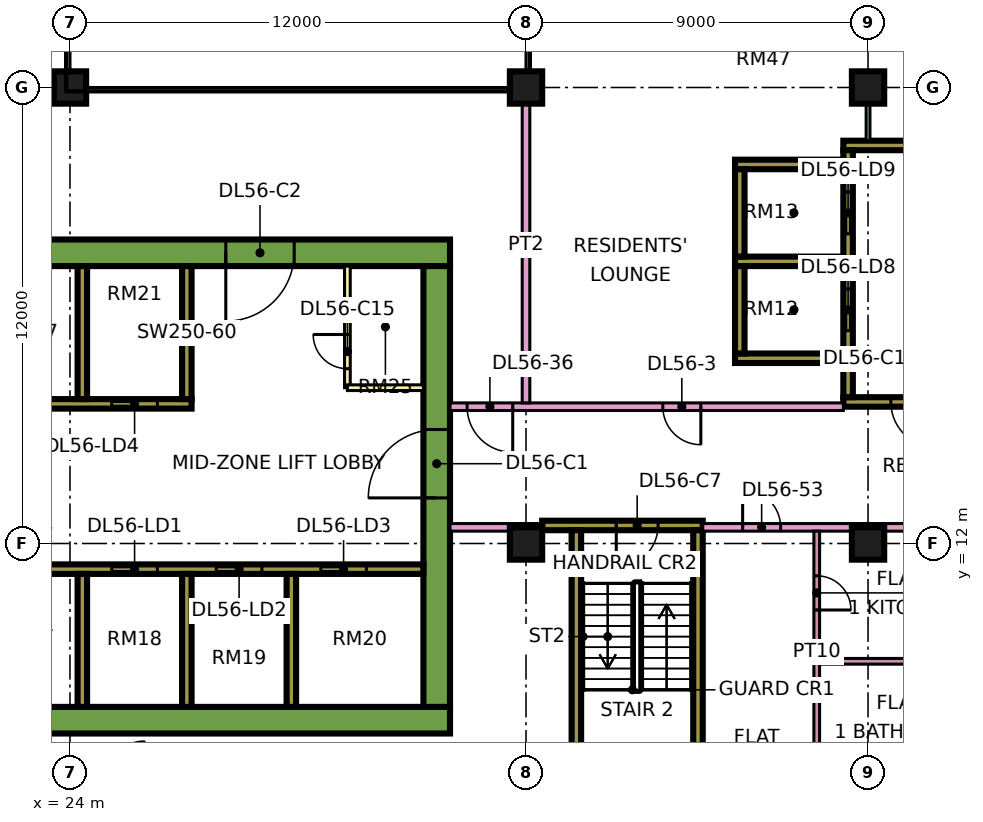
"""IFC4 building model, lengths in metres.
Left out: names, types, materials, properties, quantities, classifications, styles, units other than length and angle.
Written with IfcOpenShell. Run it as: python <this file> out.ifc"""

import sys

from ifc_helpers import new_model, si_unit, direction, frame, frame_2d, origin, origin_2d, place, context, subcontext, project, spatial, rectangle, extrude, element, fill, save


model = new_model("IFC4")
c1 = context("Model", 3, precision=1e-05, world=origin(), true_north=direction((0.0, 1.0)))
c2 = subcontext(c1, "Body", "Model", "MODEL_VIEW")
j1 = project(units=[si_unit("LENGTHUNIT", "METRE"), si_unit("PLANEANGLEUNIT", "RADIAN")], contexts=[c1])
p1 = place(None, origin())
s1 = spatial("IfcSite", under=j1, at=p1, CompositionType="ELEMENT")
p2 = place(p1, origin())
s2 = spatial("IfcBuilding", under=s1, at=p2, CompositionType="ELEMENT")
p3 = place(p2, frame((0.0, 0.0, 237.9)))
s3 = spatial("IfcBuildingStorey", under=s2, at=p3, CompositionType="ELEMENT", Elevation=237.9)
for number, where, z_axis, x_axis in (
    (1, (24.0, 24.0, 0.0), (0.0, 0.0, 1.0), (1.0, 0.0, 0.0)),
    (2, (36.0, 12.0, 0.0), (0.0, 0.0, 1.0), (1.0, 0.0, 0.0)),
    (3, (36.0, 24.0, 0.0), (0.0, 0.0, 1.0), (1.0, 0.0, 0.0)),
    (4, (45.0, 12.0, 0.0), (0.0, 0.0, 1.0), (1.0, 0.0, 0.0)),
    (5, (45.0, 24.0, 0.0), (0.0, 0.0, 1.0), (1.0, 0.0, 0.0)),
):
    element("IfcColumn", number, at=place(p3, frame(where, z_axis=z_axis, x_axis=x_axis)), inside=s3, PredefinedType="COLUMN", context=c2, shape_type="SweptSolid", body=[
        extrude(rectangle(XDim=0.85, YDim=0.85, at=origin_2d()), origin(), (0.0, 0.0, 1.0), 3.75),
    ])
p4 = place(p3, frame((9.0, 7.35, 0.0), z_axis=(0.0, 0.0, 1.0), x_axis=(1.0, 0.0, 0.0)))
e6 = element("IfcWall", 6, at=p4, inside=s3, PredefinedType="SHEAR", context=c2, shape_type="SweptSolid", body=[
    extrude(rectangle(XDim=25.0, YDim=0.7, at=frame_2d((12.5, 0.0))), origin(), (0.0, 0.0, 1.0), 3.75),
])
p5 = place(p3, frame((9.0, 19.65, 0.0), z_axis=(0.0, 0.0, 1.0), x_axis=(1.0, 0.0, 0.0)))
e7 = element("IfcWall", 7, at=p5, inside=s3, PredefinedType="SHEAR", context=c2, shape_type="SweptSolid", body=[
    extrude(rectangle(XDim=25.0, YDim=0.7, at=frame_2d((12.5, 0.0))), origin(), (0.0, 0.0, 1.0), 3.75),
])
p6 = place(p5, frame((19.1, 0.0, 0.0)))
e8 = element("IfcOpeningElement", 8, at=p6, cuts=e7, PredefinedType="OPENING", context=c2, shape_type="SweptSolid", body=[
    extrude(rectangle(XDim=1.8, YDim=2.4, at=frame_2d((0.9, 1.2))), frame((0.0, 0.36, 0.0), z_axis=(0.0, -1.0, 0.0), x_axis=(1.0, 0.0, 0.0)), (0.0, 0.0, 1.0), 0.72),
])
p7 = place(p3, frame((33.65, 7.7, 0.0), z_axis=(0.0, 0.0, 1.0), x_axis=(0.0, 1.0, 0.0)))
e9 = element("IfcWall", 9, at=p7, inside=s3, PredefinedType="SHEAR", context=c2, shape_type="SweptSolid", body=[
    extrude(rectangle(XDim=11.6, YDim=0.7, at=frame_2d((5.8, 0.0))), origin(), (0.0, 0.0, 1.0), 3.75),
])
p8 = place(p7, frame((5.5, 0.0, 0.0)))
e10 = element("IfcOpeningElement", 10, at=p8, cuts=e9, PredefinedType="OPENING", context=c2, shape_type="SweptSolid", body=[
    extrude(rectangle(XDim=1.8, YDim=2.4, at=frame_2d((0.9, 1.2))), frame((0.0, 0.36, 0.0), z_axis=(0.0, -1.0, 0.0), x_axis=(1.0, 0.0, 0.0)), (0.0, 0.0, 1.0), 0.72),
])
p9 = place(p3, frame((13.45, 11.325, 0.0), z_axis=(0.0, 0.0, 1.0), x_axis=(1.0, 0.0, 0.0)))
e11 = element("IfcWall", 11, at=p9, inside=s3, PredefinedType="SHEAR", context=c2, shape_type="SweptSolid", body=[
    extrude(rectangle(XDim=19.85, YDim=0.25, at=frame_2d((9.925, 0.0))), origin(), (0.0, 0.0, 1.0), 3.75),
])
p10 = place(p9, frame((11.65, 0.0, 0.0)))
e12 = element("IfcOpeningElement", 12, at=p10, cuts=e11, PredefinedType="OPENING", context=c2, shape_type="SweptSolid", body=[
    extrude(rectangle(XDim=1.2, YDim=2.2, at=frame_2d((0.6, 1.1))), frame((0.0, 0.135, 0.0), z_axis=(0.0, -1.0, 0.0), x_axis=(1.0, 0.0, 0.0)), (0.0, 0.0, 1.0), 0.27),
])
p11 = place(p9, frame((14.4, 0.0, 0.0)))
e13 = element("IfcOpeningElement", 13, at=p11, cuts=e11, PredefinedType="OPENING", context=c2, shape_type="SweptSolid", body=[
    extrude(rectangle(XDim=1.2, YDim=2.2, at=frame_2d((0.6, 1.1))), frame((0.0, 0.135, 0.0), z_axis=(0.0, -1.0, 0.0), x_axis=(1.0, 0.0, 0.0)), (0.0, 0.0, 1.0), 0.27),
])
p12 = place(p9, frame((17.15, 0.0, 0.0)))
e14 = element("IfcOpeningElement", 14, at=p12, cuts=e11, PredefinedType="OPENING", context=c2, shape_type="SweptSolid", body=[
    extrude(rectangle(XDim=1.2, YDim=2.2, at=frame_2d((0.6, 1.1))), frame((0.0, 0.135, 0.0), z_axis=(0.0, -1.0, 0.0), x_axis=(1.0, 0.0, 0.0)), (0.0, 0.0, 1.0), 0.27),
])
p13 = place(p9, frame((1.55, 0.0, 0.0)))
e15 = element("IfcOpeningElement", 15, at=p13, cuts=e11, PredefinedType="OPENING", context=c2, shape_type="SweptSolid", body=[
    extrude(rectangle(XDim=0.9, YDim=2.1, at=frame_2d((0.45, 1.05))), frame((0.0, 0.135, 0.0), z_axis=(0.0, -1.0, 0.0), x_axis=(1.0, 0.0, 0.0)), (0.0, 0.0, 1.0), 0.27),
])
p14 = place(p9, frame((5.05, 0.0, 0.0)))
e16 = element("IfcOpeningElement", 16, at=p14, cuts=e11, PredefinedType="OPENING", context=c2, shape_type="SweptSolid", body=[
    extrude(rectangle(XDim=0.9, YDim=2.1, at=frame_2d((0.45, 1.05))), frame((0.0, 0.135, 0.0), z_axis=(0.0, -1.0, 0.0), x_axis=(1.0, 0.0, 0.0)), (0.0, 0.0, 1.0), 0.27),
])
p15 = place(p9, frame((8.425, 0.0, 0.0)))
e17 = element("IfcOpeningElement", 17, at=p15, cuts=e11, PredefinedType="OPENING", context=c2, shape_type="SweptSolid", body=[
    extrude(rectangle(XDim=0.9, YDim=2.1, at=frame_2d((0.45, 1.05))), frame((0.0, 0.135, 0.0), z_axis=(0.0, -1.0, 0.0), x_axis=(1.0, 0.0, 0.0)), (0.0, 0.0, 1.0), 0.27),
])
p16 = place(p3, frame((13.45, 15.675, 0.0), z_axis=(0.0, 0.0, 1.0), x_axis=(1.0, 0.0, 0.0)))
e18 = element("IfcWall", 18, at=p16, inside=s3, PredefinedType="SHEAR", context=c2, shape_type="SweptSolid", body=[
    extrude(rectangle(XDim=13.75, YDim=0.25, at=frame_2d((6.875, 0.0))), origin(), (0.0, 0.0, 1.0), 3.75),
])
p17 = place(p16, frame((11.65, 0.0, 0.0)))
e19 = element("IfcOpeningElement", 19, at=p17, cuts=e18, PredefinedType="OPENING", context=c2, shape_type="SweptSolid", body=[
    extrude(rectangle(XDim=1.2, YDim=2.2, at=frame_2d((0.6, 1.1))), frame((0.0, 0.135, 0.0), z_axis=(0.0, -1.0, 0.0), x_axis=(1.0, 0.0, 0.0)), (0.0, 0.0, 1.0), 0.27),
])
for number, where, z_axis, x_axis in (
    (20, (24.325, 7.7, 0.0), (0.0, 0.0, 1.0), (0.0, 1.0, 0.0)),
    (21, (27.075, 7.7, 0.0), (0.0, 0.0, 1.0), (0.0, 1.0, 0.0)),
    (22, (29.825, 7.7, 0.0), (0.0, 0.0, 1.0), (0.0, 1.0, 0.0)),
    (23, (24.325, 15.8, 0.0), (0.0, 0.0, 1.0), (0.0, 1.0, 0.0)),
    (24, (27.075, 15.8, 0.0), (0.0, 0.0, 1.0), (0.0, 1.0, 0.0)),
):
    element("IfcWall", number, at=place(p3, frame(where, z_axis=z_axis, x_axis=x_axis)), inside=s3, PredefinedType="SHEAR", context=c2, shape_type="SweptSolid", body=[
        extrude(rectangle(XDim=3.5, YDim=0.25, at=frame_2d((1.75, 0.0))), origin(), (0.0, 0.0, 1.0), 3.75),
    ])
p18 = place(p3, frame((36.425, 12.475, 0.0), z_axis=(0.0, 0.0, 1.0), x_axis=(1.0, 0.0, 0.0)))
e25 = element("IfcWall", 25, at=p18, inside=s3, PredefinedType="SHEAR", context=c2, shape_type="SweptSolid", body=[
    extrude(rectangle(XDim=4.225, YDim=0.25, at=frame_2d((2.112, 0.0))), origin(), (0.0, 0.0, 1.0), 3.75),
])
p19 = place(p18, frame((1.95, 0.0, 0.0)))
e26 = element("IfcOpeningElement", 26, at=p19, cuts=e25, PredefinedType="OPENING", context=c2, shape_type="SweptSolid", body=[
    extrude(rectangle(XDim=1.1, YDim=2.2, at=frame_2d((0.55, 1.1))), frame((0.0, 0.135, 0.0), z_axis=(0.0, -1.0, 0.0), x_axis=(1.0, 0.0, 0.0)), (0.0, 0.0, 1.0), 0.27),
])
for number, where, z_axis, x_axis in (
    (27, (37.325, 5.85, 0.0), (0.0, 0.0, 1.0), (0.0, 1.0, 0.0)),
    (28, (40.525, 5.85, 0.0), (0.0, 0.0, 1.0), (0.0, 1.0, 0.0)),
):
    element("IfcWall", number, at=place(p3, frame(where, z_axis=z_axis, x_axis=x_axis)), inside=s3, PredefinedType="SHEAR", context=c2, shape_type="SweptSolid", body=[
        extrude(rectangle(XDim=6.5, YDim=0.25, at=frame_2d((3.25, 0.0))), origin(), (0.0, 0.0, 1.0), 3.75),
    ])
p20 = place(p3, frame((44.35, 15.725, 0.0), z_axis=(0.0, 0.0, 1.0), x_axis=(1.0, 0.0, 0.0)))
e29 = element("IfcWall", 29, at=p20, inside=s3, PredefinedType="SHEAR", context=c2, shape_type="SweptSolid", body=[
    extrude(rectangle(XDim=3.425, YDim=0.25, at=frame_2d((1.712, 0.0))), origin(), (0.0, 0.0, 1.0), 3.75),
])
p21 = place(p20, frame((1.25, 0.0, 0.0)))
e30 = element("IfcOpeningElement", 30, at=p21, cuts=e29, PredefinedType="OPENING", context=c2, shape_type="SweptSolid", body=[
    extrude(rectangle(XDim=1.2, YDim=2.2, at=frame_2d((0.6, 1.1))), frame((0.0, 0.135, 0.0), z_axis=(0.0, -1.0, 0.0), x_axis=(1.0, 0.0, 0.0)), (0.0, 0.0, 1.0), 0.27),
])
p22 = place(p3, frame((44.35, 22.475, 0.0), z_axis=(0.0, 0.0, 1.0), x_axis=(1.0, 0.0, 0.0)))
e31 = element("IfcWall", 31, at=p22, inside=s3, PredefinedType="SHEAR", context=c2, shape_type="SweptSolid", body=[
    extrude(rectangle(XDim=3.425, YDim=0.25, at=frame_2d((1.712, 0.0))), origin(), (0.0, 0.0, 1.0), 3.75),
])
p23 = place(p3, frame((44.475, 15.85, 0.0), z_axis=(0.0, 0.0, 1.0), x_axis=(0.0, 1.0, 0.0)))
e32 = element("IfcWall", 32, at=p23, inside=s3, PredefinedType="SHEAR", context=c2, shape_type="SweptSolid", body=[
    extrude(rectangle(XDim=6.5, YDim=0.25, at=frame_2d((3.25, 0.0))), origin(), (0.0, 0.0, 1.0), 3.75),
])
p24 = place(p23, frame((1.75, 0.0, 0.0)))
e33 = element("IfcOpeningElement", 33, at=p24, cuts=e32, PredefinedType="OPENING", context=c2, shape_type="SweptSolid", body=[
    extrude(rectangle(XDim=1.1, YDim=2.2, at=frame_2d((0.55, 1.1))), frame((0.0, 0.135, 0.0), z_axis=(0.0, -1.0, 0.0), x_axis=(1.0, 0.0, 0.0)), (0.0, 0.0, 1.0), 0.27),
])
p25 = place(p23, frame((4.3, 0.0, 0.0)))
e34 = element("IfcOpeningElement", 34, at=p25, cuts=e32, PredefinedType="OPENING", context=c2, shape_type="SweptSolid", body=[
    extrude(rectangle(XDim=1.1, YDim=2.2, at=frame_2d((0.55, 1.1))), frame((0.0, 0.135, 0.0), z_axis=(0.0, -1.0, 0.0), x_axis=(1.0, 0.0, 0.0)), (0.0, 0.0, 1.0), 0.27),
])
for number, where, z_axis, x_axis in (
    (35, (41.5, 16.875, 0.0), (0.0, 0.0, 1.0), (1.0, 0.0, 0.0)),
    (36, (41.5, 19.425, 0.0), (0.0, 0.0, 1.0), (1.0, 0.0, 0.0)),
    (37, (41.5, 21.975, 0.0), (0.0, 0.0, 1.0), (1.0, 0.0, 0.0)),
):
    element("IfcWall", number, at=place(p3, frame(where, z_axis=z_axis, x_axis=x_axis)), inside=s3, PredefinedType="SHEAR", context=c2, shape_type="SweptSolid", body=[
        extrude(rectangle(XDim=2.85, YDim=0.25, at=frame_2d((1.425, 0.0))), origin(), (0.0, 0.0, 1.0), 3.75),
    ])
for number, where, z_axis, x_axis in (
    (38, (41.625, 17.0, 0.0), (0.0, 0.0, 1.0), (0.0, 1.0, 0.0)),
    (39, (41.625, 19.55, 0.0), (0.0, 0.0, 1.0), (0.0, 1.0, 0.0)),
):
    element("IfcWall", number, at=place(p3, frame(where, z_axis=z_axis, x_axis=x_axis)), inside=s3, PredefinedType="SHEAR", context=c2, shape_type="SweptSolid", body=[
        extrude(rectangle(XDim=2.3, YDim=0.25, at=frame_2d((1.15, 0.0))), origin(), (0.0, 0.0, 1.0), 3.75),
    ])
p26 = place(p3, frame((31.3, 16.1, 0.0), z_axis=(0.0, 0.0, 1.0), x_axis=(0.0, 1.0, 0.0)))
e40 = element("IfcWall", 40, at=p26, inside=s3, PredefinedType="PARTITIONING", context=c2, shape_type="SweptSolid", body=[
    extrude(rectangle(XDim=3.2, YDim=0.15, at=frame_2d((1.6, 0.0))), origin(), (0.0, 0.0, 1.0), 3.35),
])
p27 = place(p26, frame((0.5, 0.0, 0.0)))
e41 = element("IfcOpeningElement", 41, at=p27, cuts=e40, PredefinedType="OPENING", context=c2, shape_type="SweptSolid", body=[
    extrude(rectangle(XDim=0.9, YDim=2.1, at=frame_2d((0.45, 1.05))), frame((0.0, 0.085, 0.0), z_axis=(0.0, -1.0, 0.0), x_axis=(1.0, 0.0, 0.0)), (0.0, 0.0, 1.0), 0.17),
])
p28 = place(p3, frame((31.3, 16.1, 0.0), z_axis=(0.0, 0.0, 1.0), x_axis=(1.0, 0.0, 0.0)))
e42 = element("IfcWall", 42, at=p28, inside=s3, PredefinedType="PARTITIONING", context=c2, shape_type="SweptSolid", body=[
    extrude(rectangle(XDim=2.0, YDim=0.15, at=frame_2d((1.0, 0.0))), origin(), (0.0, 0.0, 1.0), 3.35),
])
p29 = place(p3, frame((34.0, 12.425, 0.0), z_axis=(0.0, 0.0, 1.0), x_axis=(1.0, 0.0, 0.0)))
e43 = element("IfcWall", 43, at=p29, inside=s3, PredefinedType="PARTITIONING", context=c2, shape_type="SweptSolid", body=[
    extrude(rectangle(XDim=2.426, YDim=0.2, at=frame_2d((1.213, 0.0))), origin(), (0.0, 0.0, 1.0), 3.35),
])
p30 = place(p3, frame((34.0, 15.6, 0.0), z_axis=(0.0, 0.0, 1.0), x_axis=(1.0, 0.0, 0.0)))
e44 = element("IfcWall", 44, at=p30, inside=s3, PredefinedType="PARTITIONING", context=c2, shape_type="SweptSolid", body=[
    extrude(rectangle(XDim=10.35, YDim=0.2, at=frame_2d((5.175, 0.0))), origin(), (0.0, 0.0, 1.0), 3.35),
])
p31 = place(p30, frame((5.6, 0.0, 0.0)))
e45 = element("IfcOpeningElement", 45, at=p31, cuts=e44, PredefinedType="OPENING", context=c2, shape_type="SweptSolid", body=[
    extrude(rectangle(XDim=1.0, YDim=2.1, at=frame_2d((0.5, 1.05))), frame((0.0, 0.11, 0.0), z_axis=(0.0, -1.0, 0.0), x_axis=(1.0, 0.0, 0.0)), (0.0, 0.0, 1.0), 0.22),
])
p32 = place(p30, frame((0.45, 0.0, 0.0)))
e46 = element("IfcOpeningElement", 46, at=p32, cuts=e44, PredefinedType="OPENING", context=c2, shape_type="SweptSolid", body=[
    extrude(rectangle(XDim=1.2, YDim=2.1, at=frame_2d((0.6, 1.05))), frame((0.0, 0.11, 0.0), z_axis=(0.0, -1.0, 0.0), x_axis=(1.0, 0.0, 0.0)), (0.0, 0.0, 1.0), 0.22),
])
p33 = place(p3, frame((36.0, 15.7, 0.0), z_axis=(0.0, 0.0, 1.0), x_axis=(0.0, 1.0, 0.0)))
e47 = element("IfcWall", 47, at=p33, inside=s3, PredefinedType="PARTITIONING", context=c2, shape_type="SweptSolid", body=[
    extrude(rectangle(XDim=8.3, YDim=0.2, at=frame_2d((4.15, 0.0))), origin(), (0.0, 0.0, 1.0), 3.35),
])
p34 = place(p3, frame((40.65, 12.425, 0.0), z_axis=(0.0, 0.0, 1.0), x_axis=(1.0, 0.0, 0.0)))
e48 = element("IfcWall", 48, at=p34, inside=s3, PredefinedType="PARTITIONING", context=c2, shape_type="SweptSolid", body=[
    extrude(rectangle(XDim=22.35, YDim=0.2, at=frame_2d((11.175, 0.0))), origin(), (0.0, 0.0, 1.0), 3.35),
])
p35 = place(p34, frame((14.7, 0.0, 0.0)))
e49 = element("IfcOpeningElement", 49, at=p35, cuts=e48, PredefinedType="OPENING", context=c2, shape_type="SweptSolid", body=[
    extrude(rectangle(XDim=1.0, YDim=2.1, at=frame_2d((0.5, 1.05))), frame((0.0, 0.11, 0.0), z_axis=(0.0, -1.0, 0.0), x_axis=(1.0, 0.0, 0.0)), (0.0, 0.0, 1.0), 0.22),
])
p36 = place(p34, frame((1.05, 0.0, 0.0)))
e50 = element("IfcOpeningElement", 50, at=p36, cuts=e48, PredefinedType="OPENING", context=c2, shape_type="SweptSolid", body=[
    extrude(rectangle(XDim=1.0, YDim=2.1, at=frame_2d((0.5, 1.05))), frame((0.0, 0.11, 0.0), z_axis=(0.0, -1.0, 0.0), x_axis=(1.0, 0.0, 0.0)), (0.0, 0.0, 1.0), 0.22),
])
p37 = place(p3, frame((43.65, 5.975, 0.0), z_axis=(0.0, 0.0, 1.0), x_axis=(0.0, 1.0, 0.0)))
e51 = element("IfcWall", 51, at=p37, inside=s3, PredefinedType="PARTITIONING", context=c2, shape_type="SweptSolid", body=[
    extrude(rectangle(XDim=6.35, YDim=0.15, at=frame_2d((3.175, 0.0))), origin(), (0.0, 0.0, 1.0), 3.35),
])
p38 = place(p37, frame((4.275, 0.0, 0.0)))
e52 = element("IfcOpeningElement", 52, at=p38, cuts=e51, PredefinedType="OPENING", context=c2, shape_type="SweptSolid", body=[
    extrude(rectangle(XDim=0.9, YDim=2.1, at=frame_2d((0.45, 1.05))), frame((0.0, 0.085, 0.0), z_axis=(0.0, -1.0, 0.0), x_axis=(1.0, 0.0, 0.0)), (0.0, 0.0, 1.0), 0.17),
])
p39 = place(p3, frame((43.725, 8.9, 0.0), z_axis=(0.0, 0.0, 1.0), x_axis=(1.0, 0.0, 0.0)))
e53 = element("IfcWall", 53, at=p39, inside=s3, PredefinedType="PARTITIONING", context=c2, shape_type="SweptSolid", body=[
    extrude(rectangle(XDim=4.2, YDim=0.15, at=frame_2d((2.1, 0.0))), origin(), (0.0, 0.0, 1.0), 3.35),
])
p40 = place(p3, frame((45.0, 22.6, 0.0), z_axis=(0.0, 0.0, 1.0), x_axis=(0.0, 1.0, 0.0)))
e54 = element("IfcWall", 54, at=p40, inside=s3, PredefinedType="PARTITIONING", context=c2, shape_type="SweptSolid", body=[
    extrude(rectangle(XDim=1.4, YDim=0.1, at=frame_2d((0.7, 0.0))), origin(), (0.0, 0.0, 1.0), 3.35),
])
p41 = place(p10, origin())
e55 = element("IfcDoor", 55, at=p41, inside=s3, OperationType="DOUBLE_DOOR_SLIDING", PredefinedType="DOOR", context=c2, shape_type="SweptSolid", body=[
    extrude(rectangle(XDim=1.2, YDim=2.2, at=frame_2d((0.6, 1.1))), frame((0.0, 0.025, 0.0), z_axis=(0.0, -1.0, 0.0), x_axis=(1.0, 0.0, 0.0)), (0.0, 0.0, 1.0), 0.05),
])
fill(e12, e55)
p42 = place(p11, origin())
e56 = element("IfcDoor", 56, at=p42, inside=s3, OperationType="DOUBLE_DOOR_SLIDING", PredefinedType="DOOR", context=c2, shape_type="SweptSolid", body=[
    extrude(rectangle(XDim=1.2, YDim=2.2, at=frame_2d((0.6, 1.1))), frame((0.0, 0.025, 0.0), z_axis=(0.0, -1.0, 0.0), x_axis=(1.0, 0.0, 0.0)), (0.0, 0.0, 1.0), 0.05),
])
fill(e13, e56)
p43 = place(p12, origin())
e57 = element("IfcDoor", 57, at=p43, inside=s3, OperationType="DOUBLE_DOOR_SLIDING", PredefinedType="DOOR", context=c2, shape_type="SweptSolid", body=[
    extrude(rectangle(XDim=1.2, YDim=2.2, at=frame_2d((0.6, 1.1))), frame((0.0, 0.025, 0.0), z_axis=(0.0, -1.0, 0.0), x_axis=(1.0, 0.0, 0.0)), (0.0, 0.0, 1.0), 0.05),
])
fill(e14, e57)
p44 = place(p17, origin())
e58 = element("IfcDoor", 58, at=p44, inside=s3, OperationType="DOUBLE_DOOR_SLIDING", PredefinedType="DOOR", context=c2, shape_type="SweptSolid", body=[
    extrude(rectangle(XDim=1.2, YDim=2.2, at=frame_2d((0.6, 1.1))), frame((0.0, 0.025, 0.0), z_axis=(0.0, -1.0, 0.0), x_axis=(1.0, 0.0, 0.0)), (0.0, 0.0, 1.0), 0.05),
])
fill(e19, e58)
p45 = place(p8, origin())
e59 = element("IfcDoor", 59, at=p45, inside=s3, OperationType="DOUBLE_DOOR_SINGLE_SWING", PredefinedType="DOOR", context=c2, shape_type="SweptSolid", body=[
    extrude(rectangle(XDim=1.8, YDim=2.4, at=frame_2d((0.9, 1.2))), frame((0.0, 0.025, 0.0), z_axis=(0.0, -1.0, 0.0), x_axis=(1.0, 0.0, 0.0)), (0.0, 0.0, 1.0), 0.05),
])
fill(e10, e59)
p46 = place(p6, frame((1.8, 0.0, 0.0), z_axis=(0.0, 0.0, 1.0), x_axis=(-1.0, 0.0, 0.0)))
e60 = element("IfcDoor", 60, at=p46, inside=s3, OperationType="DOUBLE_DOOR_SINGLE_SWING", PredefinedType="DOOR", context=c2, shape_type="SweptSolid", body=[
    extrude(rectangle(XDim=1.8, YDim=2.4, at=frame_2d((0.9, 1.2))), frame((0.0, 0.025, 0.0), z_axis=(0.0, -1.0, 0.0), x_axis=(1.0, 0.0, 0.0)), (0.0, 0.0, 1.0), 0.05),
])
fill(e8, e60)
p47 = place(p19, frame((1.1, 0.0, 0.0), z_axis=(0.0, 0.0, 1.0), x_axis=(-1.0, 0.0, 0.0)))
e61 = element("IfcDoor", 61, at=p47, inside=s3, OperationType="SINGLE_SWING_LEFT", PredefinedType="DOOR", context=c2, shape_type="SweptSolid", body=[
    extrude(rectangle(XDim=1.1, YDim=2.2, at=frame_2d((0.55, 1.1))), frame((0.0, 0.025, 0.0), z_axis=(0.0, -1.0, 0.0), x_axis=(1.0, 0.0, 0.0)), (0.0, 0.0, 1.0), 0.05),
])
fill(e26, e61)
p48 = place(p21, origin())
e62 = element("IfcDoor", 62, at=p48, inside=s3, OperationType="SINGLE_SWING_RIGHT", PredefinedType="DOOR", context=c2, shape_type="SweptSolid", body=[
    extrude(rectangle(XDim=1.2, YDim=2.2, at=frame_2d((0.6, 1.1))), frame((0.0, 0.025, 0.0), z_axis=(0.0, -1.0, 0.0), x_axis=(1.0, 0.0, 0.0)), (0.0, 0.0, 1.0), 0.05),
])
fill(e30, e62)
p49 = place(p24, origin())
e63 = element("IfcDoor", 63, at=p49, inside=s3, OperationType="DOUBLE_DOOR_SLIDING", PredefinedType="DOOR", context=c2, shape_type="SweptSolid", body=[
    extrude(rectangle(XDim=1.1, YDim=2.2, at=frame_2d((0.55, 1.1))), frame((0.0, 0.025, 0.0), z_axis=(0.0, -1.0, 0.0), x_axis=(1.0, 0.0, 0.0)), (0.0, 0.0, 1.0), 0.05),
])
fill(e33, e63)
p50 = place(p25, origin())
e64 = element("IfcDoor", 64, at=p50, inside=s3, OperationType="DOUBLE_DOOR_SLIDING", PredefinedType="DOOR", context=c2, shape_type="SweptSolid", body=[
    extrude(rectangle(XDim=1.1, YDim=2.2, at=frame_2d((0.55, 1.1))), frame((0.0, 0.025, 0.0), z_axis=(0.0, -1.0, 0.0), x_axis=(1.0, 0.0, 0.0)), (0.0, 0.0, 1.0), 0.05),
])
fill(e34, e64)
p51 = place(p27, frame((0.9, 0.0, 0.0), z_axis=(0.0, 0.0, 1.0), x_axis=(-1.0, 0.0, 0.0)))
e65 = element("IfcDoor", 65, at=p51, inside=s3, OperationType="SINGLE_SWING_RIGHT", PredefinedType="DOOR", context=c2, shape_type="SweptSolid", body=[
    extrude(rectangle(XDim=0.9, YDim=2.1, at=frame_2d((0.45, 1.05))), frame((0.0, 0.025, 0.0), z_axis=(0.0, -1.0, 0.0), x_axis=(1.0, 0.0, 0.0)), (0.0, 0.0, 1.0), 0.05),
])
fill(e41, e65)
p52 = place(p31, origin())
e66 = element("IfcDoor", 66, at=p52, inside=s3, OperationType="SINGLE_SWING_RIGHT", PredefinedType="DOOR", context=c2, shape_type="SweptSolid", body=[
    extrude(rectangle(XDim=1.0, YDim=2.1, at=frame_2d((0.5, 1.05))), frame((0.0, 0.025, 0.0), z_axis=(0.0, -1.0, 0.0), x_axis=(1.0, 0.0, 0.0)), (0.0, 0.0, 1.0), 0.05),
])
fill(e45, e66)
p53 = place(p32, origin())
e67 = element("IfcDoor", 67, at=p53, inside=s3, OperationType="SINGLE_SWING_RIGHT", PredefinedType="DOOR", context=c2, shape_type="SweptSolid", body=[
    extrude(rectangle(XDim=1.2, YDim=2.1, at=frame_2d((0.6, 1.05))), frame((0.0, 0.025, 0.0), z_axis=(0.0, -1.0, 0.0), x_axis=(1.0, 0.0, 0.0)), (0.0, 0.0, 1.0), 0.05),
])
fill(e46, e67)
p54 = place(p36, origin())
e68 = element("IfcDoor", 68, at=p54, inside=s3, OperationType="SINGLE_SWING_LEFT", PredefinedType="DOOR", context=c2, shape_type="SweptSolid", body=[
    extrude(rectangle(XDim=1.0, YDim=2.1, at=frame_2d((0.5, 1.05))), frame((0.0, 0.025, 0.0), z_axis=(0.0, -1.0, 0.0), x_axis=(1.0, 0.0, 0.0)), (0.0, 0.0, 1.0), 0.05),
])
fill(e50, e68)
p55 = place(p38, frame((0.9, 0.0, 0.0), z_axis=(0.0, 0.0, 1.0), x_axis=(-1.0, 0.0, 0.0)))
e69 = element("IfcDoor", 69, at=p55, inside=s3, OperationType="SINGLE_SWING_LEFT", PredefinedType="DOOR", context=c2, shape_type="SweptSolid", body=[
    extrude(rectangle(XDim=0.9, YDim=2.1, at=frame_2d((0.45, 1.05))), frame((0.0, 0.025, 0.0), z_axis=(0.0, -1.0, 0.0), x_axis=(1.0, 0.0, 0.0)), (0.0, 0.0, 1.0), 0.05),
])
fill(e52, e69)
save(model, sys.argv[1])
